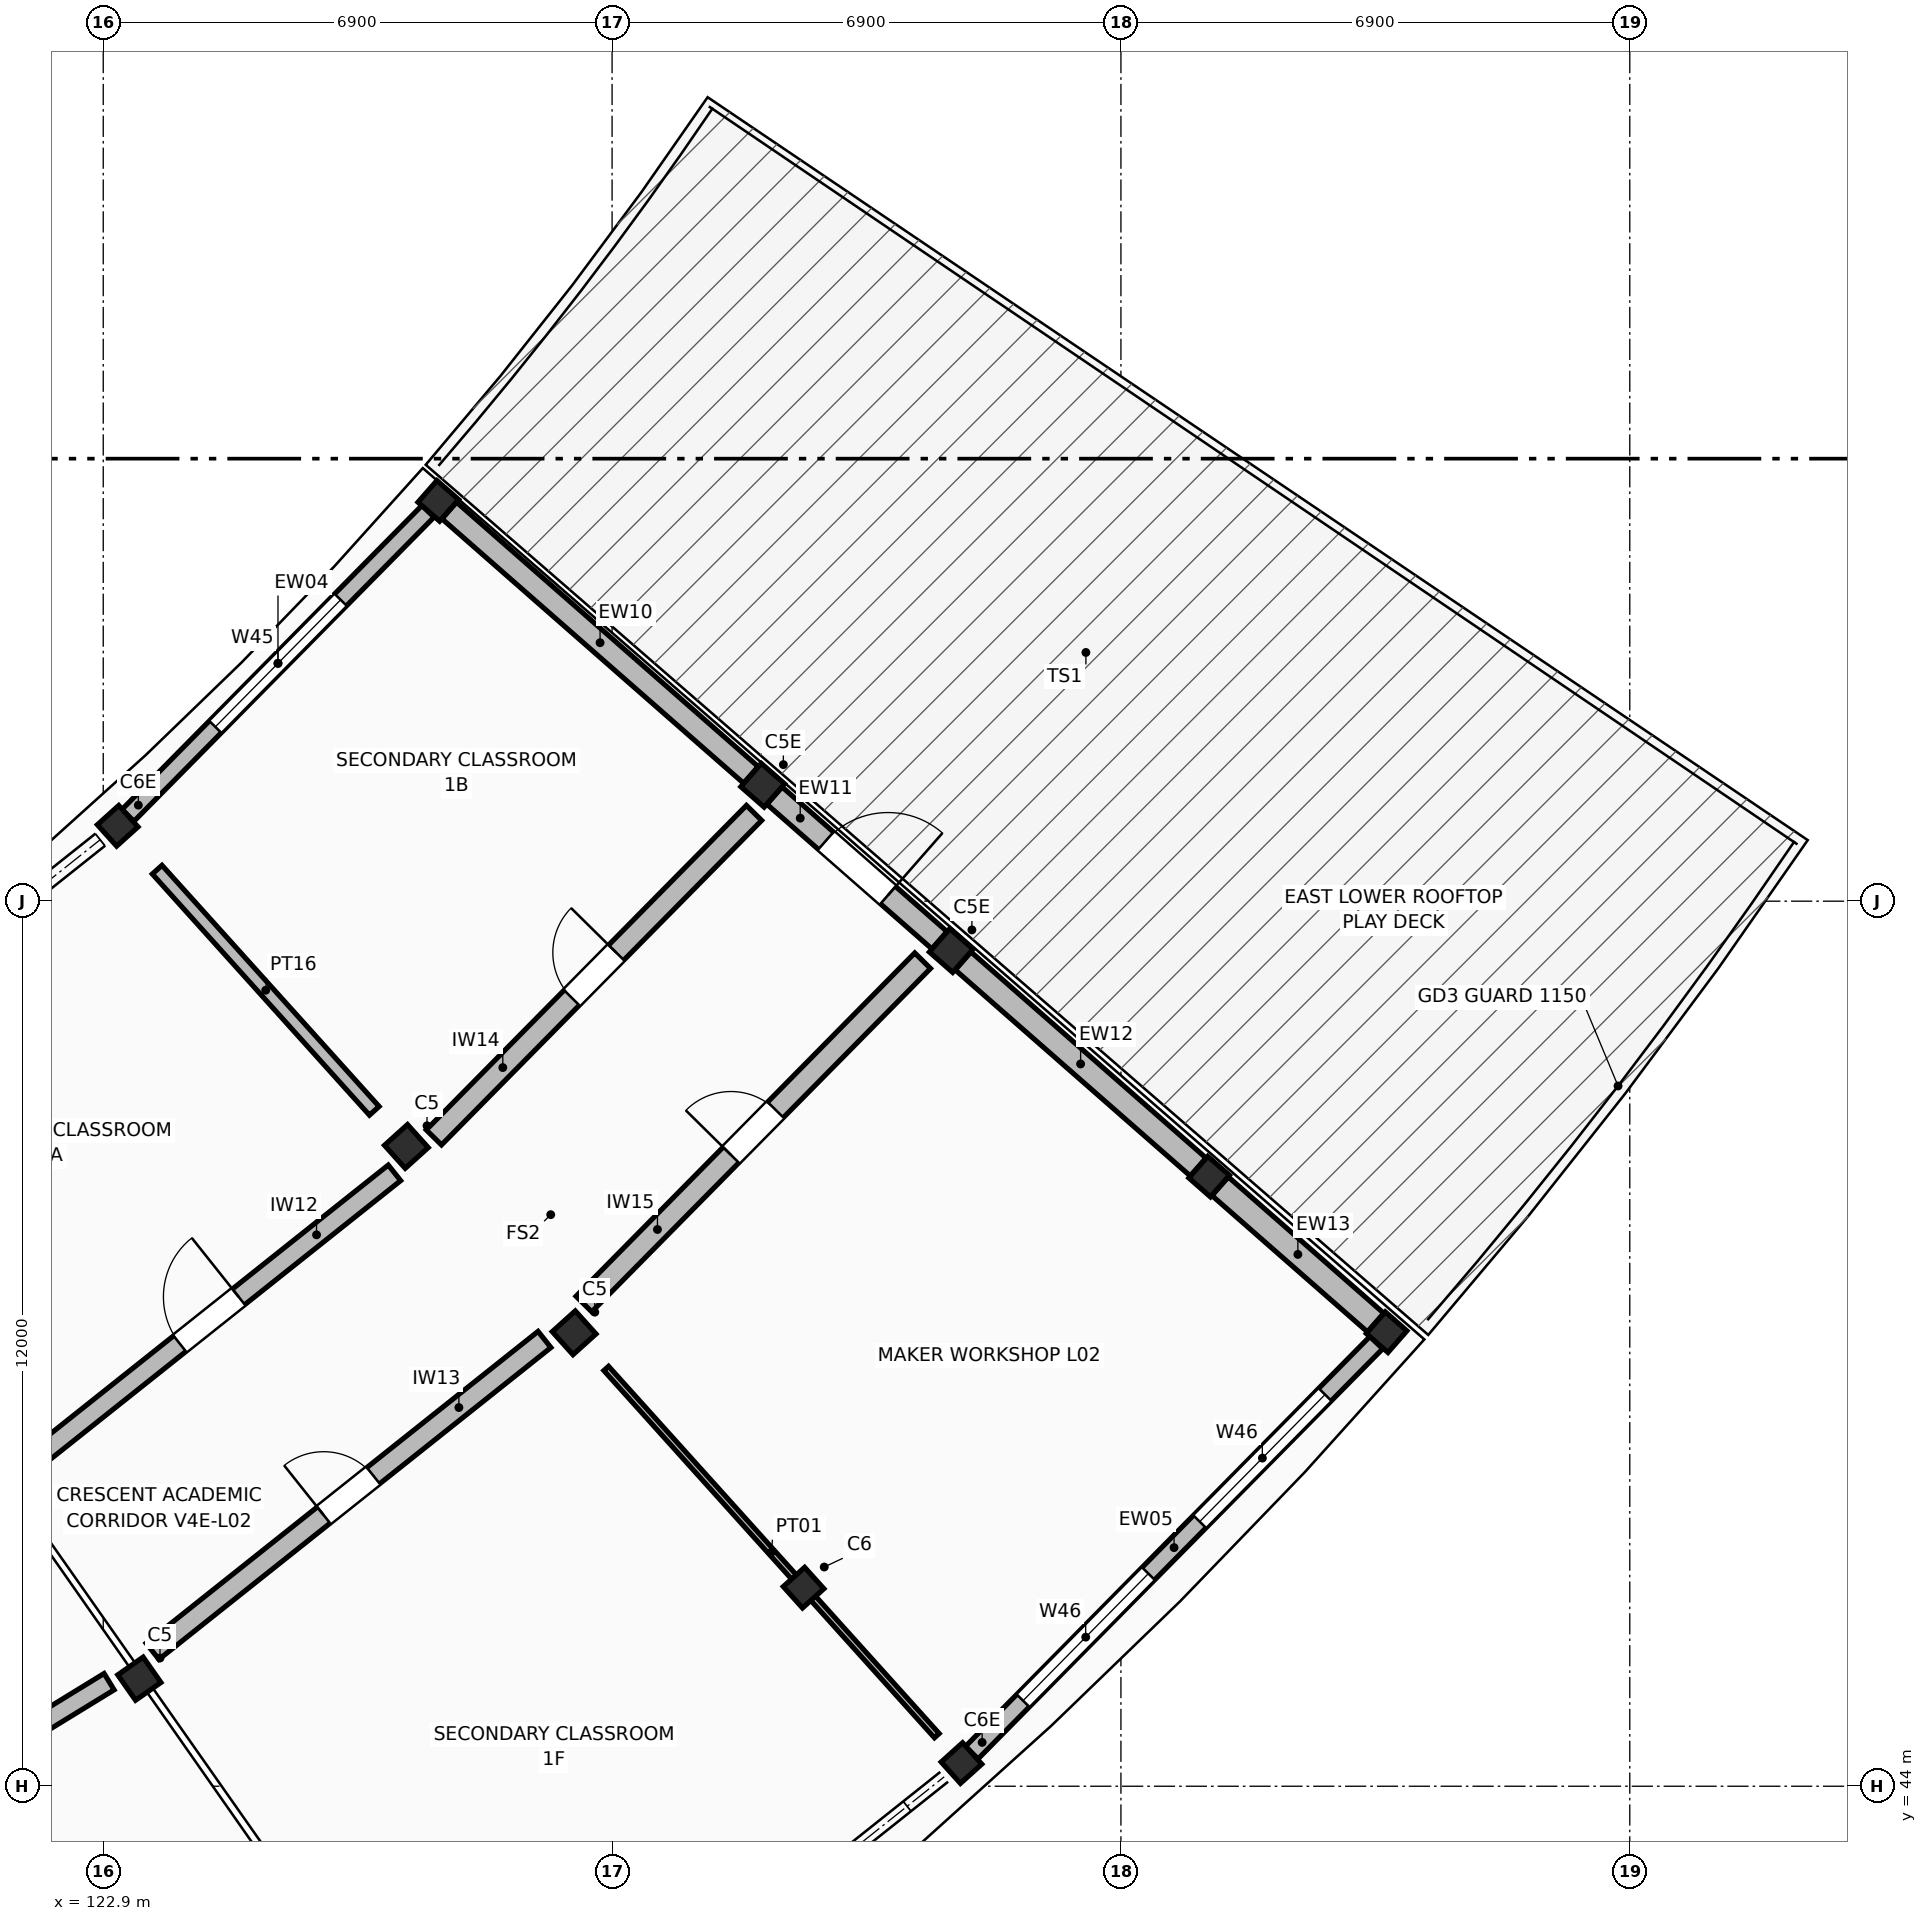
"""IFC4 building model, lengths in metres.
Left out: names, types, materials, properties, quantities, classifications, styles, units other than length and angle.
Written with IfcOpenShell. Run it as: python <this file> out.ifc"""

import sys

from ifc_helpers import new_model, si_unit, direction, frame, frame_2d, origin, origin_2d, place, context, subcontext, project, spatial, rectangle, extrude, element, fill, save


model = new_model("IFC4")
c1 = context("Model", 3, precision=1e-05, world=origin(), true_north=direction((0.0, 1.0)))
c2 = subcontext(c1, "Body", "Model", "MODEL_VIEW")
j1 = project(units=[si_unit("LENGTHUNIT", "METRE"), si_unit("PLANEANGLEUNIT", "RADIAN")], contexts=[c1])
p1 = place(None, origin())
s1 = spatial("IfcSite", under=j1, at=p1, CompositionType="ELEMENT")
p2 = place(p1, origin())
s2 = spatial("IfcBuilding", under=s1, at=p2, CompositionType="ELEMENT")
p3 = place(p2, frame((0.0, 0.0, 8.16)))
s3 = spatial("IfcBuildingStorey", under=s2, at=p3, CompositionType="ELEMENT", Elevation=8.16)
p4 = place(p3, frame((123.39, 45.458, 0.0), z_axis=(0.0, 0.0, 1.0), x_axis=(0.573576436351, -0.819152044289, 0.0)))
e1 = element("IfcColumn", 1, at=p4, inside=s3, PredefinedType="COLUMN", context=c2, shape_type="SweptSolid", body=[
    extrude(rectangle(XDim=0.42, YDim=0.42, at=origin_2d()), origin(), (0.0, 0.0, 1.0), 3.74),
])
p5 = place(p3, frame((123.096, 57.022, 0.0), z_axis=(0.0, 0.0, 1.0), x_axis=(0.669130606359, -0.743144825477, 0.0)))
e2 = element("IfcColumn", 2, at=p5, inside=s3, PredefinedType="COLUMN", context=c2, shape_type="SweptSolid", body=[
    extrude(rectangle(XDim=0.39, YDim=0.39, at=origin_2d()), origin(), (0.0, 0.0, 1.0), 3.74),
])
for number, where, z_axis, x_axis in (
    (3, (127.01, 52.675, 0.0), (0.0, 0.0, 1.0), (0.669, -0.743, 0.0)),
    (4, (129.285, 50.148, 0.0), (0.0, 0.0, 1.0), (0.669, -0.743, 0.0)),
):
    element("IfcColumn", number, at=place(p3, frame(where, z_axis=z_axis, x_axis=x_axis)), inside=s3, PredefinedType="COLUMN", context=c2, shape_type="SweptSolid", body=[
        extrude(rectangle(XDim=0.42, YDim=0.42, at=origin_2d()), origin(), (0.0, 0.0, 1.0), 3.74),
    ])
for number, where, z_axis, x_axis in (
    (5, (132.397, 46.692, 0.0), (0.0, 0.0, 1.0), (0.669, -0.743, 0.0)),
    (6, (134.538, 44.314, 0.0), (0.0, 0.0, 1.0), (0.669, -0.743, 0.0)),
    (7, (127.443, 61.428, 0.0), (0.0, 0.0, 1.0), (0.752, -0.659, 0.0)),
):
    element("IfcColumn", number, at=place(p3, frame(where, z_axis=z_axis, x_axis=x_axis)), inside=s3, PredefinedType="COLUMN", context=c2, shape_type="SweptSolid", body=[
        extrude(rectangle(XDim=0.39, YDim=0.39, at=origin_2d()), origin(), (0.0, 0.0, 1.0), 3.74),
    ])
for number, where, z_axis, x_axis in (
    (8, (131.843, 57.572, 0.0), (0.0, 0.0, 1.0), (0.752, -0.659, 0.0)),
    (9, (134.399, 55.331, 0.0), (0.0, 0.0, 1.0), (0.752, -0.659, 0.0)),
):
    element("IfcColumn", number, at=place(p3, frame(where, z_axis=z_axis, x_axis=x_axis)), inside=s3, PredefinedType="COLUMN", context=c2, shape_type="SweptSolid", body=[
        extrude(rectangle(XDim=0.42, YDim=0.42, at=origin_2d()), origin(), (0.0, 0.0, 1.0), 3.74),
    ])
for number, where, z_axis, x_axis in (
    (10, (137.896, 52.266, 0.0), (0.0, 0.0, 1.0), (0.752, -0.659, 0.0)),
    (11, (140.302, 50.156, 0.0), (0.0, 0.0, 1.0), (0.752, -0.659, 0.0)),
):
    element("IfcColumn", number, at=place(p3, frame(where, z_axis=z_axis, x_axis=x_axis)), inside=s3, PredefinedType="COLUMN", context=c2, shape_type="SweptSolid", body=[
        extrude(rectangle(XDim=0.39, YDim=0.39, at=origin_2d()), origin(), (0.0, 0.0, 1.0), 3.74),
    ])
p6 = place(p3, frame((123.235, 57.163, 0.0), z_axis=(0.0, 0.0, 1.0), x_axis=(0.702392539927, 0.711789800331, 0.0)))
e12 = element("IfcWall", 12, at=p6, inside=s3, PredefinedType="STANDARD", context=c2, shape_type="SweptSolid", body=[
    extrude(rectangle(XDim=5.793, YDim=0.228, at=frame_2d((2.897, 0.0))), origin(), (0.0, 0.0, 1.0), 2.78),
])
p7 = place(p6, frame((1.687, 0.0, 0.95)))
e13 = element("IfcOpeningElement", 13, at=p7, cuts=e12, PredefinedType="OPENING", context=c2, shape_type="SweptSolid", body=[
    extrude(rectangle(XDim=2.42, YDim=1.15, at=frame_2d((1.21, 0.575))), frame((0.0, 0.124, 0.0), z_axis=(0.0, -1.0, 0.0), x_axis=(1.0, 0.0, 0.0)), (0.0, 0.0, 1.0), 0.248),
])
p8 = place(p3, frame((134.677, 44.455, 0.0), z_axis=(0.0, 0.0, 1.0), x_axis=(0.702387300311, 0.711794970733, 0.0)))
e14 = element("IfcWall", 14, at=p8, inside=s3, PredefinedType="STANDARD", context=c2, shape_type="SweptSolid", body=[
    extrude(rectangle(XDim=7.811, YDim=0.24, at=frame_2d((3.906, 0.0))), origin(), (0.0, 0.0, 1.0), 2.78),
])
p9 = place(p8, frame((0.99, 0.0, 0.95)))
e15 = element("IfcOpeningElement", 15, at=p9, cuts=e14, PredefinedType="OPENING", context=c2, shape_type="SweptSolid", body=[
    extrude(rectangle(XDim=2.42, YDim=1.3, at=frame_2d((1.21, 0.65))), frame((0.0, 0.13, 0.0), z_axis=(0.0, -1.0, 0.0), x_axis=(1.0, 0.0, 0.0)), (0.0, 0.0, 1.0), 0.26),
])
p10 = place(p8, frame((4.401, 0.0, 0.95)))
e16 = element("IfcOpeningElement", 16, at=p10, cuts=e14, PredefinedType="OPENING", context=c2, shape_type="SweptSolid", body=[
    extrude(rectangle(XDim=2.42, YDim=1.3, at=frame_2d((1.21, 0.65))), frame((0.0, 0.13, 0.0), z_axis=(0.0, -1.0, 0.0), x_axis=(1.0, 0.0, 0.0)), (0.0, 0.0, 1.0), 0.26),
])
p11 = place(p3, frame((127.592, 61.297, 0.0), z_axis=(0.0, 0.0, 1.0), x_axis=(0.752014754072, -0.65914627334, 0.0)))
e17 = element("IfcWall", 17, at=p11, inside=s3, PredefinedType="STANDARD", context=c2, shape_type="SweptSolid", body=[
    extrude(rectangle(XDim=5.439, YDim=0.3, at=frame_2d((2.72, 0.0))), origin(), (0.0, 0.0, 1.0), 2.78),
])
p12 = place(p3, frame((132.003, 57.431, 0.0), z_axis=(0.0, 0.0, 1.0), x_axis=(0.751966127371, -0.659201747029, 0.0)))
e18 = element("IfcWall", 18, at=p12, inside=s3, PredefinedType="STANDARD", context=c2, shape_type="SweptSolid", body=[
    extrude(rectangle(XDim=2.974, YDim=0.312, at=frame_2d((1.487, 0.0))), origin(), (0.0, 0.0, 1.0), 2.78),
])
p13 = place(p12, frame((0.927, 0.0, 0.0)))
e19 = element("IfcOpeningElement", 19, at=p13, cuts=e18, PredefinedType="OPENING", context=c2, shape_type="SweptSolid", body=[
    extrude(rectangle(XDim=1.12, YDim=2.18, at=frame_2d((0.56, 1.09))), frame((0.0, 0.166, 0.0), z_axis=(0.0, -1.0, 0.0), x_axis=(1.0, 0.0, 0.0)), (0.0, 0.0, 1.0), 0.332),
])
p14 = place(p3, frame((134.56, 55.19, 0.0), z_axis=(0.0, 0.0, 1.0), x_axis=(0.752030548673, -0.659128252969, 0.0)))
e20 = element("IfcWall", 20, at=p14, inside=s3, PredefinedType="STANDARD", context=c2, shape_type="SweptSolid", body=[
    extrude(rectangle(XDim=4.239, YDim=0.324, at=frame_2d((2.119, 0.0))), origin(), (0.0, 0.0, 1.0), 2.78),
])
p15 = place(p3, frame((138.045, 52.135, 0.0), z_axis=(0.0, 0.0, 1.0), x_axis=(0.752031665926, -0.65912697824, 0.0)))
e21 = element("IfcWall", 21, at=p15, inside=s3, PredefinedType="STANDARD", context=c2, shape_type="SweptSolid", body=[
    extrude(rectangle(XDim=2.804, YDim=0.336, at=frame_2d((1.402, 0.0))), origin(), (0.0, 0.0, 1.0), 2.78),
])
p16 = place(p3, frame((117.189, 41.869, 0.0), z_axis=(0.0, 0.0, 1.0), x_axis=(0.852640514979, 0.522497992547, 0.0)))
e22 = element("IfcWall", 22, at=p16, inside=s3, PredefinedType="STANDARD", context=c2, shape_type="SweptSolid", body=[
    extrude(rectangle(XDim=6.792, YDim=0.26, at=frame_2d((3.396, 0.0))), origin(), (0.0, 0.0, 1.0), 2.75),
])
p17 = place(p16, frame((2.886, 0.0, 0.0)))
e23 = element("IfcOpeningElement", 23, at=p17, cuts=e22, PredefinedType="OPENING", context=c2, shape_type="SweptSolid", body=[
    extrude(rectangle(XDim=1.02, YDim=2.18, at=frame_2d((0.51, 1.09))), frame((0.0, 0.14, 0.0), z_axis=(0.0, -1.0, 0.0), x_axis=(1.0, 0.0, 0.0)), (0.0, 0.0, 1.0), 0.28),
])
p18 = place(p3, frame((121.824, 48.32, 0.0), z_axis=(0.0, 0.0, 1.0), x_axis=(0.782605685559, 0.622517743467, 0.0)))
e24 = element("IfcWall", 24, at=p18, inside=s3, PredefinedType="STANDARD", context=c2, shape_type="SweptSolid", body=[
    extrude(rectangle(XDim=6.42, YDim=0.27, at=frame_2d((3.21, 0.0))), origin(), (0.0, 0.0, 1.0), 2.75),
])
p19 = place(p18, frame((2.7, 0.0, 0.0)))
e25 = element("IfcOpeningElement", 25, at=p19, cuts=e24, PredefinedType="OPENING", context=c2, shape_type="SweptSolid", body=[
    extrude(rectangle(XDim=1.02, YDim=2.24, at=frame_2d((0.51, 1.12))), frame((0.0, 0.145, 0.0), z_axis=(0.0, -1.0, 0.0), x_axis=(1.0, 0.0, 0.0)), (0.0, 0.0, 1.0), 0.29),
])
p20 = place(p3, frame((123.568, 45.83, 0.0), z_axis=(0.0, 0.0, 1.0), x_axis=(0.782615780998, 0.622505051653, 0.0)))
e26 = element("IfcWall", 26, at=p20, inside=s3, PredefinedType="STANDARD", context=c2, shape_type="SweptSolid", body=[
    extrude(rectangle(XDim=6.792, YDim=0.28, at=frame_2d((3.396, 0.0))), origin(), (0.0, 0.0, 1.0), 2.75),
])
p21 = place(p20, frame((2.966, 0.0, 0.0)))
e27 = element("IfcOpeningElement", 27, at=p21, cuts=e26, PredefinedType="OPENING", context=c2, shape_type="SweptSolid", body=[
    extrude(rectangle(XDim=0.86, YDim=2.06, at=frame_2d((0.43, 1.03))), frame((0.0, 0.15, 0.0), z_axis=(0.0, -1.0, 0.0), x_axis=(1.0, 0.0, 0.0)), (0.0, 0.0, 1.0), 0.3),
])
p22 = place(p3, frame((127.384, 52.797, 0.0), z_axis=(0.0, 0.0, 1.0), x_axis=(0.702370898593, 0.7118111553, 0.0)))
e28 = element("IfcWall", 28, at=p22, inside=s3, PredefinedType="STANDARD", context=c2, shape_type="SweptSolid", body=[
    extrude(rectangle(XDim=6.181, YDim=0.29, at=frame_2d((3.09, 0.0))), origin(), (0.0, 0.0, 1.0), 2.75),
])
p23 = place(p22, frame((2.66, 0.0, 0.0)))
e29 = element("IfcOpeningElement", 29, at=p23, cuts=e28, PredefinedType="OPENING", context=c2, shape_type="SweptSolid", body=[
    extrude(rectangle(XDim=0.86, YDim=2.12, at=frame_2d((0.43, 1.06))), frame((0.0, 0.155, 0.0), z_axis=(0.0, -1.0, 0.0), x_axis=(1.0, 0.0, 0.0)), (0.0, 0.0, 1.0), 0.31),
])
p24 = place(p3, frame((129.418, 50.538, 0.0), z_axis=(0.0, 0.0, 1.0), x_axis=(0.702368484449, 0.711813537419, 0.0)))
e30 = element("IfcWall", 30, at=p24, inside=s3, PredefinedType="STANDARD", context=c2, shape_type="SweptSolid", body=[
    extrude(rectangle(XDim=6.54, YDim=0.3, at=frame_2d((3.27, 0.0))), origin(), (0.0, 0.0, 1.0), 2.75),
])
p25 = place(p24, frame((2.84, 0.0, 0.0)))
e31 = element("IfcOpeningElement", 31, at=p25, cuts=e30, PredefinedType="OPENING", context=c2, shape_type="SweptSolid", body=[
    extrude(rectangle(XDim=0.86, YDim=2.18, at=frame_2d((0.43, 1.09))), frame((0.0, 0.16, 0.0), z_axis=(0.0, -1.0, 0.0), x_axis=(1.0, 0.0, 0.0)), (0.0, 0.0, 1.0), 0.32),
])
p26 = place(p3, frame((123.631, 56.427, 0.0), z_axis=(0.0, 0.0, 1.0), x_axis=(0.669157836149, -0.743120306761, 0.0)))
e32 = element("IfcWall", 32, at=p26, inside=s3, PredefinedType="PARTITIONING", context=c2, shape_type="SweptSolid", body=[
    extrude(rectangle(XDim=4.4, YDim=0.176, at=frame_2d((2.2, 0.0))), origin(), (0.0, 0.0, 1.0), 2.75),
])
p27 = place(p3, frame((129.72, 49.665, 0.0), z_axis=(0.0, 0.0, 1.0), x_axis=(0.669115705072, -0.743158242386, 0.0)))
e33 = element("IfcWall", 33, at=p27, inside=s3, PredefinedType="PARTITIONING", context=c2, shape_type="SweptSolid", body=[
    extrude(rectangle(XDim=6.7, YDim=0.086, at=frame_2d((3.35, 0.0))), origin(), (0.0, 0.0, 1.0), 2.75),
])
p28 = place(p7, origin())
e34 = element("IfcWindow", 34, at=p28, inside=s3, PartitioningType="SINGLE_PANEL", PredefinedType="WINDOW", context=c2, shape_type="SweptSolid", body=[
    extrude(rectangle(XDim=2.42, YDim=1.15, at=frame_2d((1.21, 0.575))), frame((0.0, 0.03, 0.0), z_axis=(0.0, -1.0, 0.0), x_axis=(1.0, 0.0, 0.0)), (0.0, 0.0, 1.0), 0.06),
])
fill(e13, e34)
p29 = place(p9, origin())
e35 = element("IfcWindow", 35, at=p29, inside=s3, PartitioningType="SINGLE_PANEL", PredefinedType="WINDOW", context=c2, shape_type="SweptSolid", body=[
    extrude(rectangle(XDim=2.42, YDim=1.3, at=frame_2d((1.21, 0.65))), frame((0.0, 0.03, 0.0), z_axis=(0.0, -1.0, 0.0), x_axis=(1.0, 0.0, 0.0)), (0.0, 0.0, 1.0), 0.06),
])
fill(e15, e35)
p30 = place(p10, origin())
e36 = element("IfcWindow", 36, at=p30, inside=s3, PartitioningType="SINGLE_PANEL", PredefinedType="WINDOW", context=c2, shape_type="SweptSolid", body=[
    extrude(rectangle(XDim=2.42, YDim=1.3, at=frame_2d((1.21, 0.65))), frame((0.0, 0.03, 0.0), z_axis=(0.0, -1.0, 0.0), x_axis=(1.0, 0.0, 0.0)), (0.0, 0.0, 1.0), 0.06),
])
fill(e16, e36)
p31 = place(p13, origin())
e37 = element("IfcDoor", 37, at=p31, inside=s3, OperationType="SINGLE_SWING_RIGHT", PredefinedType="DOOR", context=c2, shape_type="SweptSolid", body=[
    extrude(rectangle(XDim=1.12, YDim=2.18, at=frame_2d((0.56, 1.09))), frame((0.0, 0.025, 0.0), z_axis=(0.0, -1.0, 0.0), x_axis=(1.0, 0.0, 0.0)), (0.0, 0.0, 1.0), 0.05),
])
fill(e19, e37)
p32 = place(p19, frame((1.02, 0.0, 0.0), z_axis=(0.0, 0.0, 1.0), x_axis=(-1.0, 0.0, 0.0)))
e38 = element("IfcDoor", 38, at=p32, inside=s3, OperationType="SINGLE_SWING_RIGHT", PredefinedType="DOOR", context=c2, shape_type="SweptSolid", body=[
    extrude(rectangle(XDim=1.02, YDim=2.24, at=frame_2d((0.51, 1.12))), frame((0.0, 0.025, 0.0), z_axis=(0.0, -1.0, 0.0), x_axis=(1.0, 0.0, 0.0)), (0.0, 0.0, 1.0), 0.05),
])
fill(e25, e38)
p33 = place(p21, origin())
e39 = element("IfcDoor", 39, at=p33, inside=s3, OperationType="SINGLE_SWING_LEFT", PredefinedType="DOOR", context=c2, shape_type="SweptSolid", body=[
    extrude(rectangle(XDim=0.86, YDim=2.06, at=frame_2d((0.43, 1.03))), frame((0.0, 0.025, 0.0), z_axis=(0.0, -1.0, 0.0), x_axis=(1.0, 0.0, 0.0)), (0.0, 0.0, 1.0), 0.05),
])
fill(e27, e39)
p34 = place(p23, frame((0.86, 0.0, 0.0), z_axis=(0.0, 0.0, 1.0), x_axis=(-1.0, 0.0, 0.0)))
e40 = element("IfcDoor", 40, at=p34, inside=s3, OperationType="SINGLE_SWING_RIGHT", PredefinedType="DOOR", context=c2, shape_type="SweptSolid", body=[
    extrude(rectangle(XDim=0.86, YDim=2.12, at=frame_2d((0.43, 1.06))), frame((0.0, 0.025, 0.0), z_axis=(0.0, -1.0, 0.0), x_axis=(1.0, 0.0, 0.0)), (0.0, 0.0, 1.0), 0.05),
])
fill(e29, e40)
p35 = place(p25, origin())
e41 = element("IfcDoor", 41, at=p35, inside=s3, OperationType="SINGLE_SWING_LEFT", PredefinedType="DOOR", context=c2, shape_type="SweptSolid", body=[
    extrude(rectangle(XDim=0.86, YDim=2.18, at=frame_2d((0.43, 1.09))), frame((0.0, 0.025, 0.0), z_axis=(0.0, -1.0, 0.0), x_axis=(1.0, 0.0, 0.0)), (0.0, 0.0, 1.0), 0.05),
])
fill(e31, e41)
save(model, sys.argv[1])
